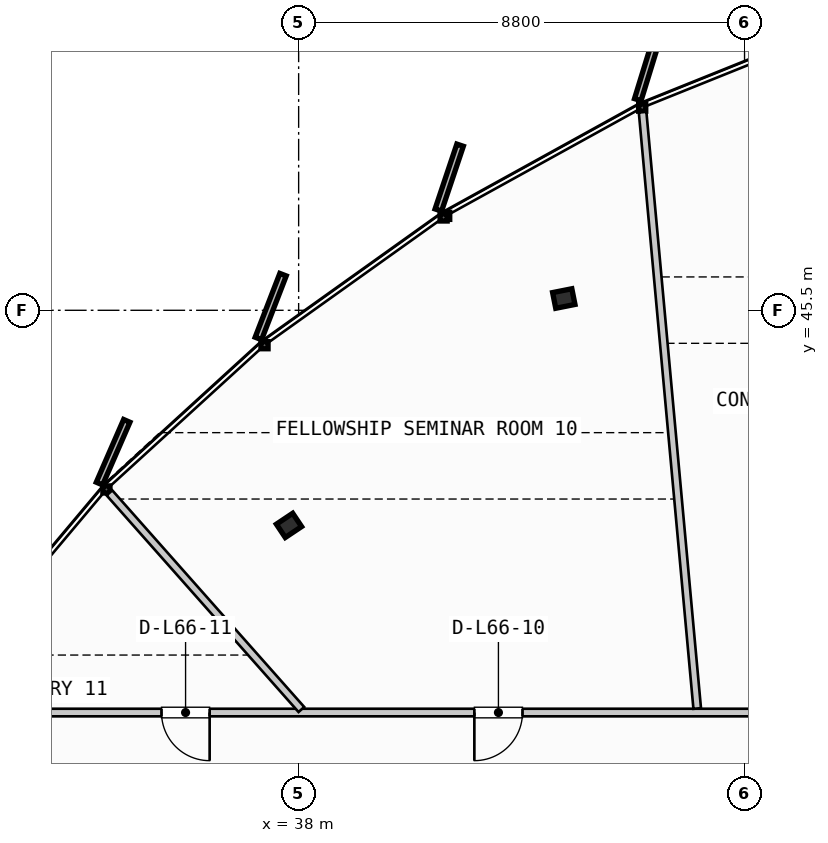
"""IFC4 building model, lengths in metres.
Left out: names, types, materials, properties, quantities, classifications, styles, units other than length and angle.
Written with IfcOpenShell. Run it as: python <this file> out.ifc"""

import sys

from ifc_helpers import new_model, si_unit, direction, frame, frame_2d, origin, origin_2d, place, context, subcontext, project, spatial, rectangle, i_section, extrude, source, transform, mapped, element, fill, save


model = new_model("IFC4")
c1 = context("Model", 3, precision=1e-05, world=origin(), true_north=direction((0.0, 1.0)))
c2 = subcontext(c1, "Body", "Model", "MODEL_VIEW")
j1 = project(units=[si_unit("LENGTHUNIT", "METRE"), si_unit("PLANEANGLEUNIT", "RADIAN")], contexts=[c1])
p1 = place(None, origin())
s1 = spatial("IfcSite", under=j1, at=p1, CompositionType="ELEMENT")
p2 = place(p1, origin())
s2 = spatial("IfcBuilding", under=s1, at=p2, CompositionType="ELEMENT")
p3 = place(p2, frame((0.0, 0.0, 252.55)))
s3 = spatial("IfcBuildingStorey", under=s2, at=p3, CompositionType="ELEMENT", Elevation=252.55)
m1 = source(origin(), c2, "Body", "SweptSolid", [
    extrude(i_section(OverallWidth=0.387, OverallDepth=0.316, WebThickness=0.019, FlangeThickness=0.028, FilletRadius=0.015, at=origin_2d()), origin(), (0.0, 0.0, 1.0), 3.21),
])
for number, where, z_axis, x_axis in (
    (1, (43.233, 45.732, 0.0), (0.0, 0.0, 1.0), (-0.195, 0.981, 0.0)),
    (2, (37.81, 41.255, 0.0), (0.0, 0.0, 1.0), (-0.556, 0.831, 0.0)),
):
    element("IfcColumn", number, at=place(p3, frame(where, z_axis=z_axis, x_axis=x_axis)), inside=s3, PredefinedType="COLUMN", context=c2, shape_type="MappedRepresentation", body=[
        mapped(m1, transform((0.0, 0.0, 0.0), scale=1.0)),
    ])
p4 = place(p3, frame((60.888, 37.562, 0.0), z_axis=(0.0, 0.0, 1.0), x_axis=(-1.0, 0.0, 0.0)))
e3 = element("IfcWall", 3, at=p4, inside=s3, PredefinedType="PARTITIONING", context=c2, shape_type="SweptSolid", body=[
    extrude(rectangle(XDim=28.038, YDim=0.15, at=frame_2d((14.019, 0.0))), origin(), (0.0, 0.0, 1.0), 2.28),
])
p5 = place(p4, frame((5.737, 0.0, 0.0)))
e4 = element("IfcOpeningElement", 4, at=p5, cuts=e3, PredefinedType="OPENING", context=c2, shape_type="SweptSolid", body=[
    extrude(rectangle(XDim=0.95, YDim=2.15, at=frame_2d((0.475, 1.075))), frame((0.0, 0.085, 0.0), z_axis=(0.0, -1.0, 0.0), x_axis=(1.0, 0.0, 0.0)), (0.0, 0.0, 1.0), 0.17),
])
p6 = place(p4, frame((12.102, 0.0, 0.0)))
e5 = element("IfcOpeningElement", 5, at=p6, cuts=e3, PredefinedType="OPENING", context=c2, shape_type="SweptSolid", body=[
    extrude(rectangle(XDim=0.95, YDim=2.15, at=frame_2d((0.475, 1.075))), frame((0.0, 0.085, 0.0), z_axis=(0.0, -1.0, 0.0), x_axis=(1.0, 0.0, 0.0)), (0.0, 0.0, 1.0), 0.17),
])
p7 = place(p4, frame((18.47, 0.0, 0.0)))
e6 = element("IfcOpeningElement", 6, at=p7, cuts=e3, PredefinedType="OPENING", context=c2, shape_type="SweptSolid", body=[
    extrude(rectangle(XDim=0.95, YDim=2.15, at=frame_2d((0.475, 1.075))), frame((0.0, 0.085, 0.0), z_axis=(0.0, -1.0, 0.0), x_axis=(1.0, 0.0, 0.0)), (0.0, 0.0, 1.0), 0.17),
])
p8 = place(p4, frame((24.644, 0.0, 0.0)))
e7 = element("IfcOpeningElement", 7, at=p8, cuts=e3, PredefinedType="OPENING", context=c2, shape_type="SweptSolid", body=[
    extrude(rectangle(XDim=0.95, YDim=2.15, at=frame_2d((0.475, 1.075))), frame((0.0, 0.085, 0.0), z_axis=(0.0, -1.0, 0.0), x_axis=(1.0, 0.0, 0.0)), (0.0, 0.0, 1.0), 0.17),
])
p9 = place(p3, frame((45.866, 37.642, 0.0), z_axis=(0.0, 0.0, 1.0), x_axis=(-0.091193290442, 0.995833210823, 0.0)))
e8 = element("IfcWall", 8, at=p9, inside=s3, PredefinedType="PARTITIONING", context=c2, shape_type="SweptSolid", body=[
    extrude(rectangle(XDim=11.817, YDim=0.15, at=frame_2d((5.909, 0.0))), origin(), (0.0, 0.0, 1.0), 2.28),
])
p10 = place(p3, frame((38.054, 37.622, 0.0), z_axis=(0.0, 0.0, 1.0), x_axis=(-0.663185102797, 0.748455422472, 0.0)))
e9 = element("IfcWall", 9, at=p10, inside=s3, PredefinedType="PARTITIONING", context=c2, shape_type="SweptSolid", body=[
    extrude(rectangle(XDim=5.712, YDim=0.15, at=frame_2d((2.856, 0.0))), origin(), (0.0, 0.0, 1.0), 2.28),
])
m2 = source(origin(), c2, "Body", "SweptSolid", [
    extrude(rectangle(XDim=0.95, YDim=2.15, at=frame_2d((0.475, 1.075))), frame((0.0, 0.025, 0.0), z_axis=(0.0, -1.0, 0.0), x_axis=(1.0, 0.0, 0.0)), (0.0, 0.0, 1.0), 0.05),
])
p11 = place(p7, origin())
e10 = element("IfcDoor", 10, at=p11, inside=s3, OperationType="SINGLE_SWING_RIGHT", PredefinedType="DOOR", context=c2, shape_type="MappedRepresentation", body=[
    mapped(m2, transform((0.0, 0.0, 0.0), scale=1.0)),
])
fill(e6, e10)
p12 = place(p8, origin())
e11 = element("IfcDoor", 11, at=p12, inside=s3, OperationType="SINGLE_SWING_LEFT", PredefinedType="DOOR", context=c2, shape_type="MappedRepresentation", body=[
    mapped(m2, transform((0.0, 0.0, 0.0), scale=1.0)),
])
fill(e7, e11)
save(model, sys.argv[1])
